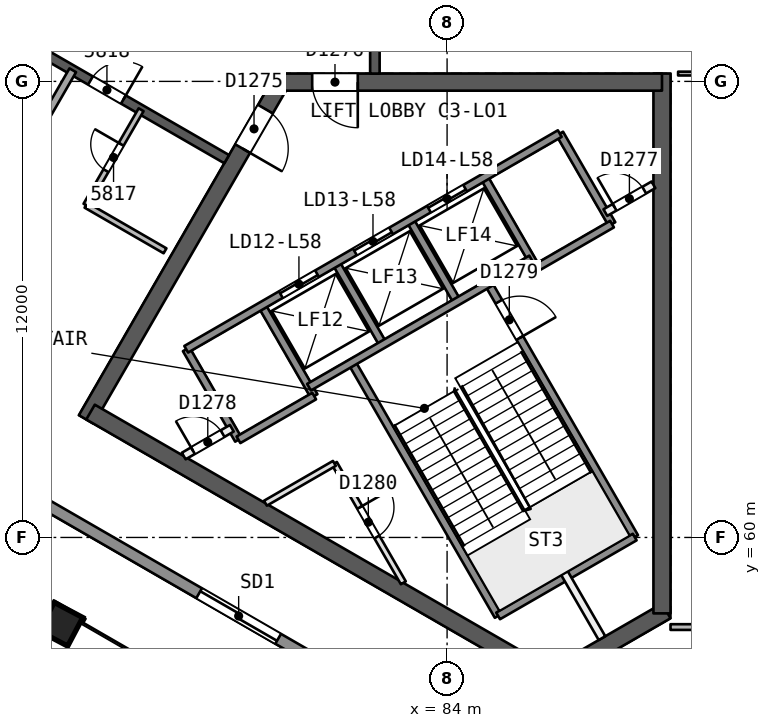
"""IFC4 building model, lengths in metres.
Left out: names, types, materials, properties, quantities, classifications, styles, units other than length and angle.
Written with IfcOpenShell. Run it as: python <this file> out.ifc"""

import sys

from ifc_helpers import new_model, si_unit, direction, frame, frame_2d, origin, origin_2d, place, context, subcontext, project, spatial, rectangle, extrude, element, fill, save


model = new_model("IFC4")
c1 = context("Model", 3, precision=1e-05, world=origin(), true_north=direction((0.0, 1.0)))
c2 = subcontext(c1, "Body", "Model", "MODEL_VIEW")
j1 = project(units=[si_unit("LENGTHUNIT", "METRE"), si_unit("PLANEANGLEUNIT", "RADIAN")], contexts=[c1])
p1 = place(None, origin())
s1 = spatial("IfcSite", under=j1, at=p1, CompositionType="ELEMENT")
p2 = place(p1, origin())
s2 = spatial("IfcBuilding", under=s1, at=p2, CompositionType="ELEMENT")
p3 = place(p2, frame((0.0, 0.0, 235.4)))
s3 = spatial("IfcBuildingStorey", under=s2, at=p3, CompositionType="ELEMENT", Elevation=235.4)
p4 = place(p3, frame((79.63, 71.981, 0.0), z_axis=(0.0, 0.0, 1.0), x_axis=(-0.500002171595, -0.86602415001, 0.0)))
e1 = element("IfcWall", 1, at=p4, inside=s3, PredefinedType="SHEAR", context=c2, shape_type="SweptSolid", body=[
    extrude(rectangle(XDim=10.25, YDim=0.45, at=frame_2d((5.125, 0.0))), origin(), (0.0, 0.0, 1.0), 3.7),
])
p5 = place(p4, frame((0.82, 0.0, 0.0)))
e2 = element("IfcOpeningElement", 2, at=p5, cuts=e1, PredefinedType="OPENING", context=c2, shape_type="SweptSolid", body=[
    extrude(rectangle(XDim=1.2, YDim=2.1, at=frame_2d((0.6, 1.05))), frame((0.0, 0.235, 0.0), z_axis=(0.0, -1.0, 0.0), x_axis=(1.0, 0.0, 0.0)), (0.0, 0.0, 1.0), 0.471),
])
p6 = place(p3, frame((74.617, 63.299, 0.0), z_axis=(0.0, 0.0, 1.0), x_axis=(0.86602594008, -0.499999071108, 0.0)))
e3 = element("IfcWall", 3, at=p6, inside=s3, PredefinedType="SHEAR", context=c2, shape_type="SweptSolid", body=[
    extrude(rectangle(XDim=14.108, YDim=0.45, at=frame_2d((7.054, 0.0))), origin(), (0.0, 0.0, 1.0), 3.7),
])
p7 = place(p3, frame((86.723, 56.31, 0.0), z_axis=(0.0, 0.0, 1.0), x_axis=(0.866042179588, 0.49997094233, 0.0)))
e4 = element("IfcWall", 4, at=p7, inside=s3, PredefinedType="SHEAR", context=c2, shape_type="SweptSolid", body=[
    extrude(rectangle(XDim=3.515, YDim=0.45, at=frame_2d((1.758, 0.0))), origin(), (0.0, 0.0, 1.0), 3.7),
])
p8 = place(p3, frame((89.655, 58.002, 0.0), z_axis=(0.0, 0.0, 1.0), x_axis=(0.0, 1.0, 0.0)))
e5 = element("IfcWall", 5, at=p8, inside=s3, PredefinedType="SHEAR", context=c2, shape_type="SweptSolid", body=[
    extrude(rectangle(XDim=14.204, YDim=0.45, at=frame_2d((7.102, 0.0))), origin(), (0.0, 0.0, 1.0), 3.7),
])
p9 = place(p3, frame((89.655, 71.981, 0.0), z_axis=(0.0, 0.0, 1.0), x_axis=(-1.0, 0.0, 0.0)))
e6 = element("IfcWall", 6, at=p9, inside=s3, PredefinedType="SHEAR", context=c2, shape_type="SweptSolid", body=[
    extrude(rectangle(XDim=10.155, YDim=0.45, at=frame_2d((5.078, 0.0))), origin(), (0.0, 0.0, 1.0), 3.7),
])
p10 = place(p9, frame((8.005, 0.0, 0.0)))
e7 = element("IfcOpeningElement", 7, at=p10, cuts=e6, PredefinedType="OPENING", context=c2, shape_type="SweptSolid", body=[
    extrude(rectangle(XDim=1.2, YDim=2.1, at=frame_2d((0.6, 1.05))), frame((0.0, 0.235, 0.0), z_axis=(0.0, -1.0, 0.0), x_axis=(1.0, 0.0, 0.0)), (0.0, 0.0, 1.0), 0.471),
])
p11 = place(p3, frame((82.1, 72.206, 0.0), z_axis=(0.0, 0.0, 1.0), x_axis=(0.0, 1.0, 0.0)))
e8 = element("IfcWall", 8, at=p11, inside=s3, PredefinedType="SHEAR", context=c2, shape_type="SweptSolid", body=[
    extrude(rectangle(XDim=15.588, YDim=0.25, at=frame_2d((7.794, 0.0))), origin(), (0.0, 0.0, 1.0), 3.3),
])
p12 = place(p11, frame((2.15, 0.0, 0.0)))
e9 = element("IfcOpeningElement", 9, at=p12, cuts=e8, PredefinedType="OPENING", context=c2, shape_type="SweptSolid", body=[
    extrude(rectangle(XDim=1.0, YDim=2.1, at=frame_2d((0.5, 1.05))), frame((0.0, 0.135, 0.0), z_axis=(0.0, -1.0, 0.0), x_axis=(1.0, 0.0, 0.0)), (0.0, 0.0, 1.0), 0.271),
])
p13 = place(p11, frame((7.662, 0.0, 0.0)))
e10 = element("IfcOpeningElement", 10, at=p13, cuts=e8, PredefinedType="OPENING", context=c2, shape_type="SweptSolid", body=[
    extrude(rectangle(XDim=1.2, YDim=2.4, at=frame_2d((0.6, 1.2))), frame((0.0, 0.135, 0.0), z_axis=(0.0, -1.0, 0.0), x_axis=(1.0, 0.0, 0.0)), (0.0, 0.0, 1.0), 0.271),
])
p14 = place(p11, frame((11.606, 0.0, 0.0)))
e11 = element("IfcOpeningElement", 11, at=p14, cuts=e8, PredefinedType="OPENING", context=c2, shape_type="SweptSolid", body=[
    extrude(rectangle(XDim=1.0, YDim=2.1, at=frame_2d((0.5, 1.05))), frame((0.0, 0.135, 0.0), z_axis=(0.0, -1.0, 0.0), x_axis=(1.0, 0.0, 0.0)), (0.0, 0.0, 1.0), 0.271),
])
p15 = place(p3, frame((64.7, 77.748, 0.0), z_axis=(0.0, 0.0, 1.0), x_axis=(0.866026492143, -0.499998114903, 0.0)))
e12 = element("IfcWall", 12, at=p15, inside=s3, PredefinedType="SHEAR", context=c2, shape_type="SweptSolid", body=[
    extrude(rectangle(XDim=15.588, YDim=0.25, at=frame_2d((7.794, 0.0))), origin(), (0.0, 0.0, 1.0), 3.3),
])
p16 = place(p15, frame((2.982, 0.0, 0.0)))
e13 = element("IfcOpeningElement", 13, at=p16, cuts=e12, PredefinedType="OPENING", context=c2, shape_type="SweptSolid", body=[
    extrude(rectangle(XDim=1.0, YDim=2.1, at=frame_2d((0.5, 1.05))), frame((0.0, 0.135, 0.0), z_axis=(0.0, -1.0, 0.0), x_axis=(1.0, 0.0, 0.0)), (0.0, 0.0, 1.0), 0.271),
])
p17 = place(p15, frame((8.538, 0.0, 0.0)))
e14 = element("IfcOpeningElement", 14, at=p17, cuts=e12, PredefinedType="OPENING", context=c2, shape_type="SweptSolid", body=[
    extrude(rectangle(XDim=1.1, YDim=2.1, at=frame_2d((0.55, 1.05))), frame((0.0, 0.135, 0.0), z_axis=(0.0, -1.0, 0.0), x_axis=(1.0, 0.0, 0.0)), (0.0, 0.0, 1.0), 0.271),
])
p18 = place(p15, frame((11.45, 0.0, 0.0)))
e15 = element("IfcOpeningElement", 15, at=p18, cuts=e12, PredefinedType="OPENING", context=c2, shape_type="SweptSolid", body=[
    extrude(rectangle(XDim=1.0, YDim=2.1, at=frame_2d((0.5, 1.05))), frame((0.0, 0.135, 0.0), z_axis=(0.0, -1.0, 0.0), x_axis=(1.0, 0.0, 0.0)), (0.0, 0.0, 1.0), 0.271),
])
p19 = place(p3, frame((73.838, 57.688, 0.0), z_axis=(0.000857522362, 0.02282328747, 0.99973914708), x_axis=(-0.499938957707, -0.865825156964, 0.020194953204)))
e16 = element("IfcColumn", 16, at=p19, inside=s3, PredefinedType="COLUMN", context=c2, shape_type="SweptSolid", body=[
    extrude(rectangle(XDim=0.85, YDim=0.85, at=origin_2d()), origin(), (0.0, 0.0, 1.0), 3.701),
])
p20 = place(p3, frame((90.079, 72.206, 0.0), z_axis=(0.0, 0.0, 1.0), x_axis=(1.0, 0.0, 0.0)))
e17 = element("IfcWall", 17, at=p20, inside=s3, PredefinedType="PARTITIONING", context=c2, shape_type="SweptSolid", body=[
    extrude(rectangle(XDim=2.125, YDim=0.1, at=frame_2d((1.062, 0.0))), origin(), (0.0, 0.0, 1.0), 3.3),
])
p21 = place(p20, frame((0.613, 0.0, 0.0)))
e18 = element("IfcOpeningElement", 18, at=p21, cuts=e17, PredefinedType="OPENING", context=c2, shape_type="SweptSolid", body=[
    extrude(rectangle(XDim=0.9, YDim=2.1, at=frame_2d((0.45, 1.05))), frame((0.0, 0.061, 0.0), z_axis=(0.0, -1.0, 0.0), x_axis=(1.0, 0.0, 0.0)), (0.0, 0.0, 1.0), 0.121),
])
p22 = place(p3, frame((89.879, 57.642, 0.0), z_axis=(0.0, 0.0, 1.0), x_axis=(1.0, 0.0, 0.0)))
e19 = element("IfcWall", 19, at=p22, inside=s3, PredefinedType="PARTITIONING", context=c2, shape_type="SweptSolid", body=[
    extrude(rectangle(XDim=2.325, YDim=0.15, at=frame_2d((1.162, 0.0))), origin(), (0.0, 0.0, 1.0), 3.3),
])
p23 = place(p22, frame((0.762, 0.0, 0.0)))
e20 = element("IfcOpeningElement", 20, at=p23, cuts=e19, PredefinedType="OPENING", context=c2, shape_type="SweptSolid", body=[
    extrude(rectangle(XDim=0.8, YDim=2.1, at=frame_2d((0.4, 1.05))), frame((0.0, 0.085, 0.0), z_axis=(0.0, -1.0, 0.0), x_axis=(1.0, 0.0, 0.0)), (0.0, 0.0, 1.0), 0.171),
])
p24 = place(p3, frame((69.098, 63.542, 0.0), z_axis=(0.0, 0.0, 1.0), x_axis=(0.499992962407, 0.866029466902, 0.0)))
e21 = element("IfcWall", 21, at=p24, inside=s3, PredefinedType="PARTITIONING", context=c2, shape_type="SweptSolid", body=[
    extrude(rectangle(XDim=10.104, YDim=0.2, at=frame_2d((5.052, 0.0))), origin(), (0.0, 0.0, 1.0), 3.3),
])
p25 = place(p3, frame((76.578, 67.542, 0.0), z_axis=(0.0, 0.0, 1.0), x_axis=(-0.866038271014, 0.499977712642, 0.0)))
e22 = element("IfcWall", 22, at=p25, inside=s3, PredefinedType="PARTITIONING", context=c2, shape_type="SweptSolid", body=[
    extrude(rectangle(XDim=2.401, YDim=0.15, at=frame_2d((1.2, 0.0))), origin(), (0.0, 0.0, 1.0), 3.3),
])
p26 = place(p3, frame((74.498, 68.743, 0.0), z_axis=(0.0, 0.0, 1.0), x_axis=(0.499987231761, 0.866032775405, 0.0)))
e23 = element("IfcWall", 23, at=p26, inside=s3, PredefinedType="PARTITIONING", context=c2, shape_type="SweptSolid", body=[
    extrude(rectangle(XDim=2.9, YDim=0.15, at=frame_2d((1.45, 0.0))), origin(), (0.0, 0.0, 1.0), 3.3),
])
p27 = place(p26, frame((1.05, 0.0, 0.0)))
e24 = element("IfcOpeningElement", 24, at=p27, cuts=e23, PredefinedType="OPENING", context=c2, shape_type="SweptSolid", body=[
    extrude(rectangle(XDim=0.8, YDim=2.1, at=frame_2d((0.4, 1.05))), frame((0.0, 0.085, 0.0), z_axis=(0.0, -1.0, 0.0), x_axis=(1.0, 0.0, 0.0)), (0.0, 0.0, 1.0), 0.171),
])
p28 = place(p3, frame((87.932, 52.496, 0.0), z_axis=(0.0, 0.0, 1.0), x_axis=(-0.866025334516, 0.500000119977, 0.0)))
e25 = element("IfcWall", 25, at=p28, inside=s3, PredefinedType="SOLIDWALL", context=c2, shape_type="SweptSolid", body=[
    extrude(rectangle(XDim=49.903, YDim=0.3, at=frame_2d((24.952, 0.0))), origin(), (0.0, 0.0, 1.0), 3.3),
])
p29 = place(p28, frame((23.907, 0.0, 0.0)))
e26 = element("IfcOpeningElement", 26, at=p29, cuts=e25, PredefinedType="OPENING", context=c2, shape_type="SweptSolid", body=[
    extrude(rectangle(XDim=2.4, YDim=2.4, at=frame_2d((1.2, 1.2))), frame((0.0, 0.161, 0.0), z_axis=(0.0, -1.0, 0.0), x_axis=(1.0, 0.0, 0.0)), (0.0, 0.0, 1.0), 0.321),
])
p30 = place(p28, frame((37.985, 0.0, 0.0)))
e27 = element("IfcOpeningElement", 27, at=p30, cuts=e25, PredefinedType="OPENING", context=c2, shape_type="SweptSolid", body=[
    extrude(rectangle(XDim=2.4, YDim=2.4, at=frame_2d((1.2, 1.2))), frame((0.0, 0.161, 0.0), z_axis=(0.0, -1.0, 0.0), x_axis=(1.0, 0.0, 0.0)), (0.0, 0.0, 1.0), 0.321),
])
p31 = place(p28, frame((9.674, 0.0, 0.0)))
e28 = element("IfcOpeningElement", 28, at=p31, cuts=e25, PredefinedType="OPENING", context=c2, shape_type="SweptSolid", body=[
    extrude(rectangle(XDim=2.4, YDim=2.4, at=frame_2d((1.2, 1.2))), frame((0.0, 0.161, 0.0), z_axis=(0.0, -1.0, 0.0), x_axis=(1.0, 0.0, 0.0)), (0.0, 0.0, 1.0), 0.321),
])
p32 = place(p3, frame((77.135, 64.952, 0.0), z_axis=(0.0, 0.0, 1.0), x_axis=(0.499996545922, -0.866027397988, 0.0)))
e29 = element("IfcWall", 29, at=p32, inside=s3, PredefinedType="SOLIDWALL", context=c2, shape_type="SweptSolid", body=[
    extrude(rectangle(XDim=2.75, YDim=0.2, at=frame_2d((1.375, 0.0))), origin(), (0.0, 0.0, 1.0), 3.3),
])
p33 = place(p3, frame((81.034, 61.949, 0.0), z_axis=(0.0, 0.0, 1.0), x_axis=(0.499945732631, -0.866056732798, 0.0)))
e30 = element("IfcWall", 30, at=p33, inside=s3, PredefinedType="PARTITIONING", context=c2, shape_type="SweptSolid", body=[
    extrude(rectangle(XDim=3.628, YDim=0.15, at=frame_2d((1.814, 0.0))), origin(), (0.0, 0.0, 1.0), 3.3),
])
p34 = place(p33, frame((1.337, 0.0, 0.0)))
e31 = element("IfcOpeningElement", 31, at=p34, cuts=e30, PredefinedType="OPENING", context=c2, shape_type="SweptSolid", body=[
    extrude(rectangle(XDim=0.9, YDim=2.1, at=frame_2d((0.45, 1.05))), frame((0.0, 0.085, 0.0), z_axis=(0.0, -1.0, 0.0), x_axis=(1.0, 0.0, 0.0)), (0.0, 0.0, 1.0), 0.171),
])
p35 = place(p3, frame((79.127, 66.102, 0.0), z_axis=(0.0, 0.0, 1.0), x_axis=(0.499996545922, -0.866027397988, 0.0)))
e32 = element("IfcWall", 32, at=p35, inside=s3, PredefinedType="SOLIDWALL", context=c2, shape_type="SweptSolid", body=[
    extrude(rectangle(XDim=2.75, YDim=0.2, at=frame_2d((1.375, 0.0))), origin(), (0.0, 0.0, 1.0), 3.3),
])
p36 = place(p3, frame((81.493, 64.604, 0.0), z_axis=(0.0, 0.0, 1.0), x_axis=(0.500006057782, -0.866021906294, 0.0)))
e33 = element("IfcWall", 33, at=p36, inside=s3, PredefinedType="SOLIDWALL", context=c2, shape_type="SweptSolid", body=[
    extrude(rectangle(XDim=7.7, YDim=0.2, at=frame_2d((3.85, 0.0))), origin(), (0.0, 0.0, 1.0), 3.3),
])
p37 = place(p3, frame((81.076, 67.227, 0.0), z_axis=(0.0, 0.0, 1.0), x_axis=(0.50000366821, -0.866023285932, 0.0)))
e34 = element("IfcWall", 34, at=p37, inside=s3, PredefinedType="SOLIDWALL", context=c2, shape_type="SweptSolid", body=[
    extrude(rectangle(XDim=2.48, YDim=0.2, at=frame_2d((1.24, 0.0))), origin(), (0.0, 0.0, 1.0), 3.3),
])
p38 = place(p3, frame((87.09, 59.06, 0.0), z_axis=(0.0, 0.0, 1.0), x_axis=(0.500011643316, -0.866018681408, 0.0)))
e35 = element("IfcWall", 35, at=p38, inside=s3, PredefinedType="PARTITIONING", context=c2, shape_type="SweptSolid", body=[
    extrude(rectangle(XDim=1.973, YDim=0.2, at=frame_2d((0.987, 0.0))), origin(), (0.0, 0.0, 1.0), 3.3),
])
p39 = place(p3, frame((83.024, 68.352, 0.0), z_axis=(0.0, 0.0, 1.0), x_axis=(0.50000366821, -0.866023285932, 0.0)))
e36 = element("IfcWall", 36, at=p39, inside=s3, PredefinedType="SOLIDWALL", context=c2, shape_type="SweptSolid", body=[
    extrude(rectangle(XDim=2.48, YDim=0.2, at=frame_2d((1.24, 0.0))), origin(), (0.0, 0.0, 1.0), 3.3),
])
p40 = place(p3, frame((85.087, 66.679, 0.0), z_axis=(0.0, 0.0, 1.0), x_axis=(0.500019787375, -0.866013979237, 0.0)))
e37 = element("IfcWall", 37, at=p40, inside=s3, PredefinedType="SOLIDWALL", context=c2, shape_type="SweptSolid", body=[
    extrude(rectangle(XDim=7.7, YDim=0.2, at=frame_2d((3.85, 0.0))), origin(), (0.0, 0.0, 1.0), 3.3),
])
p41 = place(p40, frame((0.55, 0.0, 0.0)))
e38 = element("IfcOpeningElement", 38, at=p41, cuts=e37, PredefinedType="OPENING", context=c2, shape_type="SweptSolid", body=[
    extrude(rectangle(XDim=1.1, YDim=2.1, at=frame_2d((0.55, 1.05))), frame((0.0, 0.11, 0.0), z_axis=(0.0, -1.0, 0.0), x_axis=(1.0, 0.0, 0.0)), (0.0, 0.0, 1.0), 0.221),
])
for number, where, z_axis, x_axis in (
    (39, (84.973, 69.477, 0.0), (0.0, 0.0, 1.0), (0.5, -0.866, 0.0)),
    (40, (86.965, 70.626, 0.0), (0.0, 0.0, 1.0), (0.5, -0.866, 0.0)),
):
    element("IfcWall", number, at=place(p3, frame(where, z_axis=z_axis, x_axis=x_axis)), inside=s3, PredefinedType="SOLIDWALL", context=c2, shape_type="SweptSolid", body=[
        extrude(rectangle(XDim=2.75, YDim=0.2, at=frame_2d((1.375, 0.0))), origin(), (0.0, 0.0, 1.0), 3.3),
    ])
p42 = place(p3, frame((77.135, 64.952, 0.0), z_axis=(0.0, 0.0, 1.0), x_axis=(0.866031916153, 0.499988720078, 0.0)))
e41 = element("IfcWall", 41, at=p42, inside=s3, PredefinedType="SOLIDWALL", context=c2, shape_type="SweptSolid", body=[
    extrude(rectangle(XDim=11.35, YDim=0.2, at=frame_2d((5.675, 0.0))), origin(), (0.0, 0.0, 1.0), 3.3),
])
p43 = place(p42, frame((2.875, 0.0, 0.0)))
e42 = element("IfcOpeningElement", 42, at=p43, cuts=e41, PredefinedType="OPENING", context=c2, shape_type="SweptSolid", body=[
    extrude(rectangle(XDim=1.1, YDim=2.1, at=frame_2d((0.55, 1.05))), frame((0.0, 0.11, 0.0), z_axis=(0.0, -1.0, 0.0), x_axis=(1.0, 0.0, 0.0)), (0.0, 0.0, 1.0), 0.221),
])
p44 = place(p42, frame((5.125, 0.0, 0.0)))
e43 = element("IfcOpeningElement", 43, at=p44, cuts=e41, PredefinedType="OPENING", context=c2, shape_type="SweptSolid", body=[
    extrude(rectangle(XDim=1.1, YDim=2.1, at=frame_2d((0.55, 1.05))), frame((0.0, 0.11, 0.0), z_axis=(0.0, -1.0, 0.0), x_axis=(1.0, 0.0, 0.0)), (0.0, 0.0, 1.0), 0.221),
])
p45 = place(p42, frame((7.375, 0.0, 0.0)))
e44 = element("IfcOpeningElement", 44, at=p45, cuts=e41, PredefinedType="OPENING", context=c2, shape_type="SweptSolid", body=[
    extrude(rectangle(XDim=1.1, YDim=2.1, at=frame_2d((0.55, 1.05))), frame((0.0, 0.11, 0.0), z_axis=(0.0, -1.0, 0.0), x_axis=(1.0, 0.0, 0.0)), (0.0, 0.0, 1.0), 0.221),
])
p46 = place(p3, frame((77.07, 62.143, 0.0), z_axis=(0.0, 0.0, 1.0), x_axis=(0.866013036001, 0.500021421018, 0.0)))
e45 = element("IfcWall", 45, at=p46, inside=s3, PredefinedType="PARTITIONING", context=c2, shape_type="SweptSolid", body=[
    extrude(rectangle(XDim=1.461, YDim=0.2, at=frame_2d((0.73, 0.0))), origin(), (0.0, 0.0, 1.0), 3.3),
])
p47 = place(p46, frame((0.281, 0.0, 0.0)))
e46 = element("IfcOpeningElement", 46, at=p47, cuts=e45, PredefinedType="OPENING", context=c2, shape_type="SweptSolid", body=[
    extrude(rectangle(XDim=0.9, YDim=2.1, at=frame_2d((0.45, 1.05))), frame((0.0, 0.11, 0.0), z_axis=(0.0, -1.0, 0.0), x_axis=(1.0, 0.0, 0.0)), (0.0, 0.0, 1.0), 0.221),
])
p48 = place(p3, frame((88.165, 68.548, 0.0), z_axis=(0.0, 0.0, 1.0), x_axis=(0.866013036001, 0.500021421018, 0.0)))
e47 = element("IfcWall", 47, at=p48, inside=s3, PredefinedType="PARTITIONING", context=c2, shape_type="SweptSolid", body=[
    extrude(rectangle(XDim=1.461, YDim=0.2, at=frame_2d((0.73, 0.0))), origin(), (0.0, 0.0, 1.0), 3.3),
])
p49 = place(p48, frame((0.281, 0.0, 0.0)))
e48 = element("IfcOpeningElement", 48, at=p49, cuts=e47, PredefinedType="OPENING", context=c2, shape_type="SweptSolid", body=[
    extrude(rectangle(XDim=0.9, YDim=2.1, at=frame_2d((0.45, 1.05))), frame((0.0, 0.11, 0.0), z_axis=(0.0, -1.0, 0.0), x_axis=(1.0, 0.0, 0.0)), (0.0, 0.0, 1.0), 0.221),
])
p50 = place(p3, frame((80.367, 63.954, 0.0), z_axis=(0.0, 0.0, 1.0), x_axis=(0.866026575979, 0.499997969693, 0.0)))
e49 = element("IfcWall", 49, at=p50, inside=s3, PredefinedType="SOLIDWALL", context=c2, shape_type="SweptSolid", body=[
    extrude(rectangle(XDim=6.75, YDim=0.2, at=frame_2d((3.375, 0.0))), origin(), (0.0, 0.0, 1.0), 3.3),
])
p51 = place(p3, frame((78.51, 62.57, 0.0), z_axis=(0.0, 0.0, 1.0), x_axis=(0.866053019151, 0.499952165731, 0.0)))
e50 = element("IfcWall", 50, at=p51, inside=s3, PredefinedType="SOLIDWALL", context=c2, shape_type="SweptSolid", body=[
    extrude(rectangle(XDim=2.3, YDim=0.2, at=frame_2d((1.15, 0.0))), origin(), (0.0, 0.0, 1.0), 3.3),
])
p52 = place(p3, frame((86.348, 67.095, 0.0), z_axis=(0.0, 0.0, 1.0), x_axis=(0.86602648383, 0.499998129301, 0.0)))
e51 = element("IfcWall", 51, at=p52, inside=s3, PredefinedType="SOLIDWALL", context=c2, shape_type="SweptSolid", body=[
    extrude(rectangle(XDim=2.3, YDim=0.2, at=frame_2d((1.15, 0.0))), origin(), (0.0, 0.0, 1.0), 3.3),
])
p53 = place(p3, frame((79.22, 60.901, 0.0), z_axis=(0.0, 0.0, 1.0), x_axis=(0.866040030748, 0.499974664501, 0.0)))
e52 = element("IfcWall", 52, at=p53, inside=s3, PredefinedType="PARTITIONING", context=c2, shape_type="SweptSolid", body=[
    extrude(rectangle(XDim=2.095, YDim=0.15, at=frame_2d((1.047, 0.0))), origin(), (0.0, 0.0, 1.0), 3.3),
])
p54 = place(p3, frame((85.343, 57.935, 0.0), z_axis=(0.0, 0.0, 1.0), x_axis=(0.866004344652, 0.500036473714, 0.0)))
e53 = element("IfcWall", 53, at=p54, inside=s3, PredefinedType="SOLIDWALL", context=c2, shape_type="SweptSolid", body=[
    extrude(rectangle(XDim=4.15, YDim=0.2, at=frame_2d((2.075, 0.0))), origin(), (0.0, 0.0, 1.0), 3.3),
])
p55 = place(p27, origin())
e54 = element("IfcDoor", 54, at=p55, inside=s3, OperationType="SINGLE_SWING_RIGHT", PredefinedType="NOTDEFINED", context=c2, shape_type="SweptSolid", body=[
    extrude(rectangle(XDim=0.8, YDim=2.1, at=frame_2d((0.4, 1.05))), frame((0.0, 0.025, 0.0), z_axis=(0.0, -1.0, 0.0), x_axis=(1.0, 0.0, 0.0)), (0.0, 0.0, 1.0), 0.05),
])
fill(e24, e54)
p56 = place(p18, origin())
e55 = element("IfcDoor", 55, at=p56, inside=s3, OperationType="SINGLE_SWING_RIGHT", PredefinedType="NOTDEFINED", context=c2, shape_type="SweptSolid", body=[
    extrude(rectangle(XDim=1.0, YDim=2.1, at=frame_2d((0.5, 1.05))), frame((0.0, 0.025, 0.0), z_axis=(0.0, -1.0, 0.0), x_axis=(1.0, 0.0, 0.0)), (0.0, 0.0, 1.0), 0.05),
])
fill(e15, e55)
p57 = place(p31, origin())
e56 = element("IfcDoor", 56, at=p57, inside=s3, OperationType="SLIDING_TO_LEFT", PredefinedType="NOTDEFINED", context=c2, shape_type="SweptSolid", body=[
    extrude(rectangle(XDim=2.4, YDim=2.4, at=frame_2d((1.2, 1.2))), frame((0.0, 0.025, 0.0), z_axis=(0.0, -1.0, 0.0), x_axis=(1.0, 0.0, 0.0)), (0.0, 0.0, 1.0), 0.05),
])
fill(e28, e56)
p58 = place(p5, origin())
e57 = element("IfcDoor", 57, at=p58, inside=s3, OperationType="SINGLE_SWING_RIGHT", PredefinedType="NOTDEFINED", context=c2, shape_type="SweptSolid", body=[
    extrude(rectangle(XDim=1.2, YDim=2.1, at=frame_2d((0.6, 1.05))), frame((0.0, 0.025, 0.0), z_axis=(0.0, -1.0, 0.0), x_axis=(1.0, 0.0, 0.0)), (0.0, 0.0, 1.0), 0.05),
])
fill(e2, e57)
p59 = place(p10, origin())
e58 = element("IfcDoor", 58, at=p59, inside=s3, OperationType="SINGLE_SWING_LEFT", PredefinedType="NOTDEFINED", context=c2, shape_type="SweptSolid", body=[
    extrude(rectangle(XDim=1.2, YDim=2.1, at=frame_2d((0.6, 1.05))), frame((0.0, 0.025, 0.0), z_axis=(0.0, -1.0, 0.0), x_axis=(1.0, 0.0, 0.0)), (0.0, 0.0, 1.0), 0.05),
])
fill(e7, e58)
p60 = place(p43, origin())
e59 = element("IfcDoor", 59, at=p60, inside=s3, OperationType="SLIDING_TO_LEFT", PredefinedType="NOTDEFINED", context=c2, shape_type="SweptSolid", body=[
    extrude(rectangle(XDim=1.1, YDim=2.1, at=frame_2d((0.55, 1.05))), frame((0.0, 0.025, 0.0), z_axis=(0.0, -1.0, 0.0), x_axis=(1.0, 0.0, 0.0)), (0.0, 0.0, 1.0), 0.05),
])
fill(e42, e59)
p61 = place(p44, origin())
e60 = element("IfcDoor", 60, at=p61, inside=s3, OperationType="SLIDING_TO_RIGHT", PredefinedType="NOTDEFINED", context=c2, shape_type="SweptSolid", body=[
    extrude(rectangle(XDim=1.1, YDim=2.1, at=frame_2d((0.55, 1.05))), frame((0.0, 0.025, 0.0), z_axis=(0.0, -1.0, 0.0), x_axis=(1.0, 0.0, 0.0)), (0.0, 0.0, 1.0), 0.05),
])
fill(e43, e60)
p62 = place(p45, origin())
e61 = element("IfcDoor", 61, at=p62, inside=s3, OperationType="SLIDING_TO_LEFT", PredefinedType="NOTDEFINED", context=c2, shape_type="SweptSolid", body=[
    extrude(rectangle(XDim=1.1, YDim=2.1, at=frame_2d((0.55, 1.05))), frame((0.0, 0.025, 0.0), z_axis=(0.0, -1.0, 0.0), x_axis=(1.0, 0.0, 0.0)), (0.0, 0.0, 1.0), 0.05),
])
fill(e44, e61)
p63 = place(p49, origin())
e62 = element("IfcDoor", 62, at=p63, inside=s3, OperationType="SINGLE_SWING_LEFT", PredefinedType="NOTDEFINED", context=c2, shape_type="SweptSolid", body=[
    extrude(rectangle(XDim=0.9, YDim=2.1, at=frame_2d((0.45, 1.05))), frame((0.0, 0.025, 0.0), z_axis=(0.0, -1.0, 0.0), x_axis=(1.0, 0.0, 0.0)), (0.0, 0.0, 1.0), 0.05),
])
fill(e48, e62)
p64 = place(p47, origin())
e63 = element("IfcDoor", 63, at=p64, inside=s3, OperationType="SINGLE_SWING_LEFT", PredefinedType="NOTDEFINED", context=c2, shape_type="SweptSolid", body=[
    extrude(rectangle(XDim=0.9, YDim=2.1, at=frame_2d((0.45, 1.05))), frame((0.0, 0.025, 0.0), z_axis=(0.0, -1.0, 0.0), x_axis=(1.0, 0.0, 0.0)), (0.0, 0.0, 1.0), 0.05),
])
fill(e46, e63)
p65 = place(p41, origin())
e64 = element("IfcDoor", 64, at=p65, inside=s3, OperationType="SINGLE_SWING_RIGHT", PredefinedType="NOTDEFINED", context=c2, shape_type="SweptSolid", body=[
    extrude(rectangle(XDim=1.1, YDim=2.1, at=frame_2d((0.55, 1.05))), frame((0.0, 0.025, 0.0), z_axis=(0.0, -1.0, 0.0), x_axis=(1.0, 0.0, 0.0)), (0.0, 0.0, 1.0), 0.05),
])
fill(e38, e64)
p66 = place(p34, origin())
e65 = element("IfcDoor", 65, at=p66, inside=s3, OperationType="SINGLE_SWING_LEFT", PredefinedType="NOTDEFINED", context=c2, shape_type="SweptSolid", body=[
    extrude(rectangle(XDim=0.9, YDim=2.1, at=frame_2d((0.45, 1.05))), frame((0.0, 0.025, 0.0), z_axis=(0.0, -1.0, 0.0), x_axis=(1.0, 0.0, 0.0)), (0.0, 0.0, 1.0), 0.05),
])
fill(e31, e65)
save(model, sys.argv[1])
